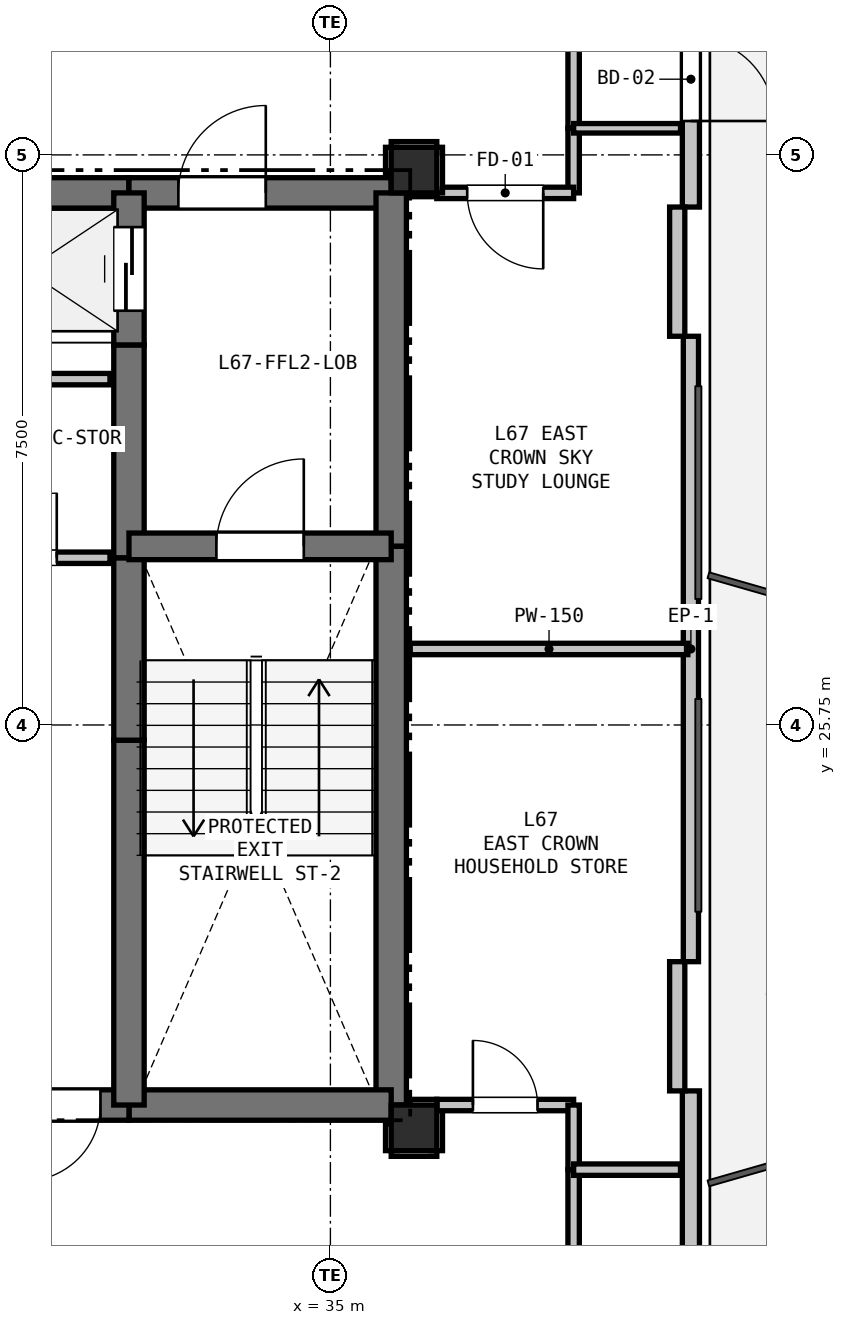
"""IFC4 building model, lengths in metres.
Left out: names, types, materials, properties, quantities, classifications, styles, units other than length and angle.
Written with IfcOpenShell. Run it as: python <this file> out.ifc"""

import sys

from ifc_helpers import new_model, si_unit, direction, frame, frame_2d, origin, origin_2d, place, context, subcontext, project, spatial, rectangle, extrude, element, fill, save


model = new_model("IFC4")
c1 = context("Model", 3, precision=1e-05, world=origin(), true_north=direction((0.0, 1.0)))
c2 = subcontext(c1, "Body", "Model", "MODEL_VIEW")
j1 = project(units=[si_unit("LENGTHUNIT", "METRE"), si_unit("PLANEANGLEUNIT", "RADIAN")], contexts=[c1])
p1 = place(None, origin())
s1 = spatial("IfcSite", under=j1, at=p1, CompositionType="ELEMENT")
p2 = place(p1, origin())
s2 = spatial("IfcBuilding", under=s1, at=p2, CompositionType="ELEMENT")
p3 = place(p2, frame((0.0, 0.0, 239.7)))
s3 = spatial("IfcBuildingStorey", under=s2, at=p3, CompositionType="ELEMENT", Elevation=239.7)
for number, where, z_axis, x_axis in (
    (1, (36.1, 33.05, 0.0), (0.0, 0.0, 1.0), (1.0, 0.0, 0.0)),
    (2, (36.1, 20.45, 0.0), (0.0, 0.0, 1.0), (1.0, 0.0, 0.0)),
):
    element("IfcColumn", number, at=place(p3, frame(where, z_axis=z_axis, x_axis=x_axis)), inside=s3, PredefinedType="COLUMN", context=c2, shape_type="SweptSolid", body=[
        extrude(rectangle(XDim=0.6, YDim=0.6, at=origin_2d()), origin(), (0.0, 0.0, 1.0), 3.3),
    ])
p4 = place(p3, frame((39.743, 41.492, 0.0), z_axis=(0.0, 0.0, 1.0), x_axis=(0.0, -1.0, 0.0)))
e3 = element("IfcWall", 3, at=p4, inside=s3, PredefinedType="SOLIDWALL", context=c2, shape_type="SweptSolid", body=[
    extrude(rectangle(XDim=8.928, YDim=0.225, at=frame_2d((4.464, 0.0))), origin(), (0.0, 0.0, 1.0), 2.7),
])
p5 = place(p4, frame((6.696, 0.0, 0.0)))
e4 = element("IfcOpeningElement", 4, at=p5, cuts=e3, PredefinedType="OPENING", context=c2, shape_type="SweptSolid", body=[
    extrude(rectangle(XDim=1.1, YDim=2.1, at=frame_2d((0.55, 1.05))), frame((0.0, 0.123, 0.0), z_axis=(0.0, -1.0, 0.0), x_axis=(1.0, 0.0, 0.0)), (0.0, 0.0, 1.0), 0.245),
])
p6 = place(p3, frame((39.743, 30.864, 0.0), z_axis=(0.0, 0.0, 1.0), x_axis=(0.0, -1.0, 0.0)))
e5 = element("IfcWall", 5, at=p6, inside=s3, PredefinedType="PARAPET", context=c2, shape_type="SweptSolid", body=[
    extrude(rectangle(XDim=8.228, YDim=0.2, at=frame_2d((4.114, 0.0))), origin(), (0.0, 0.0, 1.0), 0.2),
])
p7 = place(p3, frame((39.743, 20.936, 0.0), z_axis=(0.0, 0.0, 1.0), x_axis=(0.0, -1.0, 0.0)))
e6 = element("IfcWall", 6, at=p7, inside=s3, PredefinedType="SOLIDWALL", context=c2, shape_type="SweptSolid", body=[
    extrude(rectangle(XDim=8.928, YDim=0.225, at=frame_2d((4.464, 0.0))), origin(), (0.0, 0.0, 1.0), 2.7),
])
p8 = place(p7, frame((5.56, 0.0, 0.9)))
e7 = element("IfcOpeningElement", 7, at=p8, cuts=e6, PredefinedType="OPENING", context=c2, shape_type="SweptSolid", body=[
    extrude(rectangle(XDim=1.8, YDim=1.5, at=frame_2d((0.9, 0.75))), frame((0.0, 0.123, 0.0), z_axis=(0.0, -1.0, 0.0), x_axis=(1.0, 0.0, 0.0)), (0.0, 0.0, 1.0), 0.245),
])
for number, where, z_axis, x_axis in (
    (8, (39.563, 32.564, 0.0), (0.0, 0.0, 1.0), (0.0, -1.0, 0.0)),
    (9, (39.563, 22.636, 0.0), (0.0, 0.0, 1.0), (0.0, -1.0, 0.0)),
):
    element("IfcWall", number, at=place(p3, frame(where, z_axis=z_axis, x_axis=x_axis)), inside=s3, PredefinedType="PARAPET", context=c2, shape_type="SweptSolid", body=[
        extrude(rectangle(XDim=1.7, YDim=0.2, at=frame_2d((0.85, 0.0))), origin(), (0.0, 0.0, 1.0), 2.7),
    ])
p9 = place(p3, frame((29.65, 32.75, 0.0), z_axis=(0.0, 0.0, 1.0), x_axis=(1.0, 0.0, 0.0)))
e10 = element("IfcWall", 10, at=p9, inside=s3, PredefinedType="SHEAR", context=c2, shape_type="SweptSolid", body=[
    extrude(rectangle(XDim=2.7, YDim=0.4, at=frame_2d((1.35, 0.0))), origin(), (0.0, 0.0, 1.0), 3.08),
])
p10 = place(p3, frame((32.35, 32.75, 0.0), z_axis=(0.0, 0.0, 1.0), x_axis=(1.0, 0.0, 0.0)))
e11 = element("IfcWall", 11, at=p10, inside=s3, PredefinedType="SHEAR", context=c2, shape_type="SweptSolid", body=[
    extrude(rectangle(XDim=3.45, YDim=0.4, at=frame_2d((1.725, 0.0))), origin(), (0.0, 0.0, 1.0), 3.08),
])
p11 = place(p10, frame((0.65, 0.0, 0.0)))
e12 = element("IfcOpeningElement", 12, at=p11, cuts=e11, PredefinedType="OPENING", context=c2, shape_type="SweptSolid", body=[
    extrude(rectangle(XDim=1.15, YDim=2.15, at=frame_2d((0.575, 1.075))), frame((0.0, 0.21, 0.0), z_axis=(0.0, -1.0, 0.0), x_axis=(1.0, 0.0, 0.0)), (0.0, 0.0, 1.0), 0.42),
])
p12 = place(p3, frame((35.8, 32.75, 0.0), z_axis=(0.0, 0.0, 1.0), x_axis=(0.0, -1.0, 0.0)))
e13 = element("IfcWall", 13, at=p12, inside=s3, PredefinedType="SHEAR", context=c2, shape_type="SweptSolid", body=[
    extrude(rectangle(XDim=4.65, YDim=0.4, at=frame_2d((2.325, 0.0))), origin(), (0.0, 0.0, 1.0), 3.08),
])
p13 = place(p3, frame((35.8, 28.1, 0.0), z_axis=(0.0, 0.0, 1.0), x_axis=(0.0, -1.0, 0.0)))
e14 = element("IfcWall", 14, at=p13, inside=s3, PredefinedType="SHEAR", context=c2, shape_type="SweptSolid", body=[
    extrude(rectangle(XDim=7.35, YDim=0.4, at=frame_2d((3.675, 0.0))), origin(), (0.0, 0.0, 1.0), 3.08),
])
p14 = place(p3, frame((35.8, 20.75, 0.0), z_axis=(0.0, 0.0, 1.0), x_axis=(-1.0, 0.0, 0.0)))
e15 = element("IfcWall", 15, at=p14, inside=s3, PredefinedType="SHEAR", context=c2, shape_type="SweptSolid", body=[
    extrude(rectangle(XDim=3.45, YDim=0.4, at=frame_2d((1.725, 0.0))), origin(), (0.0, 0.0, 1.0), 3.08),
])
p15 = place(p3, frame((32.35, 20.75, 0.0), z_axis=(0.0, 0.0, 1.0), x_axis=(-1.0, 0.0, 0.0)))
e16 = element("IfcWall", 16, at=p15, inside=s3, PredefinedType="SHEAR", context=c2, shape_type="SweptSolid", body=[
    extrude(rectangle(XDim=1.75, YDim=0.4, at=frame_2d((0.875, 0.0))), origin(), (0.0, 0.0, 1.0), 3.08),
])
p16 = place(p15, frame((0.375, 0.0, 0.0)))
e17 = element("IfcOpeningElement", 17, at=p16, cuts=e16, PredefinedType="OPENING", context=c2, shape_type="SweptSolid", body=[
    extrude(rectangle(XDim=1.0, YDim=2.15, at=frame_2d((0.5, 1.075))), frame((0.0, 0.21, 0.0), z_axis=(0.0, -1.0, 0.0), x_axis=(1.0, 0.0, 0.0)), (0.0, 0.0, 1.0), 0.42),
])
p17 = place(p3, frame((32.35, 20.75, 0.0), z_axis=(0.0, 0.0, 1.0), x_axis=(0.0, 1.0, 0.0)))
e18 = element("IfcWall", 18, at=p17, inside=s3, PredefinedType="SHEAR", context=c2, shape_type="SweptSolid", body=[
    extrude(rectangle(XDim=4.8, YDim=0.4, at=frame_2d((2.4, 0.0))), origin(), (0.0, 0.0, 1.0), 3.08),
])
p18 = place(p3, frame((32.35, 25.55, 0.0), z_axis=(0.0, 0.0, 1.0), x_axis=(0.0, 1.0, 0.0)))
e19 = element("IfcWall", 19, at=p18, inside=s3, PredefinedType="SHEAR", context=c2, shape_type="SweptSolid", body=[
    extrude(rectangle(XDim=2.4, YDim=0.4, at=frame_2d((1.2, 0.0))), origin(), (0.0, 0.0, 1.0), 3.08),
])
p19 = place(p3, frame((32.35, 27.95, 0.0), z_axis=(0.0, 0.0, 1.0), x_axis=(0.0, 1.0, 0.0)))
e20 = element("IfcWall", 20, at=p19, inside=s3, PredefinedType="SHEAR", context=c2, shape_type="SweptSolid", body=[
    extrude(rectangle(XDim=2.8, YDim=0.4, at=frame_2d((1.4, 0.0))), origin(), (0.0, 0.0, 1.0), 3.08),
])
p20 = place(p3, frame((32.35, 30.75, 0.0), z_axis=(0.0, 0.0, 1.0), x_axis=(0.0, 1.0, 0.0)))
e21 = element("IfcWall", 21, at=p20, inside=s3, PredefinedType="SHEAR", context=c2, shape_type="SweptSolid", body=[
    extrude(rectangle(XDim=2.0, YDim=0.4, at=frame_2d((1.0, 0.0))), origin(), (0.0, 0.0, 1.0), 3.08),
])
p21 = place(p20, frame((0.45, 0.0, 0.0)))
e22 = element("IfcOpeningElement", 22, at=p21, cuts=e21, PredefinedType="OPENING", context=c2, shape_type="SweptSolid", body=[
    extrude(rectangle(XDim=1.1, YDim=2.15, at=frame_2d((0.55, 1.075))), frame((0.0, 0.21, 0.0), z_axis=(0.0, -1.0, 0.0), x_axis=(1.0, 0.0, 0.0)), (0.0, 0.0, 1.0), 0.42),
])
p22 = place(p3, frame((32.35, 28.1, 0.0), z_axis=(0.0, 0.0, 1.0), x_axis=(1.0, 0.0, 0.0)))
e23 = element("IfcWall", 23, at=p22, inside=s3, PredefinedType="SHEAR", context=c2, shape_type="SweptSolid", body=[
    extrude(rectangle(XDim=3.45, YDim=0.35, at=frame_2d((1.725, 0.0))), origin(), (0.0, 0.0, 1.0), 3.08),
])
p23 = place(p22, frame((1.15, 0.0, 0.0)))
e24 = element("IfcOpeningElement", 24, at=p23, cuts=e23, PredefinedType="OPENING", context=c2, shape_type="SweptSolid", body=[
    extrude(rectangle(XDim=1.15, YDim=2.15, at=frame_2d((0.575, 1.075))), frame((0.0, 0.185, 0.0), z_axis=(0.0, -1.0, 0.0), x_axis=(1.0, 0.0, 0.0)), (0.0, 0.0, 1.0), 0.37),
])
p24 = place(p3, frame((32.1, 30.3, 0.0), z_axis=(0.0, 0.0, 1.0), x_axis=(-1.0, 0.0, 0.0)))
e25 = element("IfcWall", 25, at=p24, inside=s3, PredefinedType="PARTITIONING", context=c2, shape_type="SweptSolid", body=[
    extrude(rectangle(XDim=2.25, YDim=0.15, at=frame_2d((1.125, 0.0))), origin(), (0.0, 0.0, 1.0), 3.08),
])
p25 = place(p3, frame((29.85, 27.95, 0.0), z_axis=(0.0, 0.0, 1.0), x_axis=(1.0, 0.0, 0.0)))
e26 = element("IfcWall", 26, at=p25, inside=s3, PredefinedType="PARTITIONING", context=c2, shape_type="SweptSolid", body=[
    extrude(rectangle(XDim=2.25, YDim=0.15, at=frame_2d((1.125, 0.0))), origin(), (0.0, 0.0, 1.0), 3.08),
])
p26 = place(p25, frame((0.7, 0.0, 0.0)))
e27 = element("IfcOpeningElement", 27, at=p26, cuts=e26, PredefinedType="OPENING", context=c2, shape_type="SweptSolid", body=[
    extrude(rectangle(XDim=0.85, YDim=2.1, at=frame_2d((0.425, 1.05))), frame((0.0, 0.085, 0.0), z_axis=(0.0, -1.0, 0.0), x_axis=(1.0, 0.0, 0.0)), (0.0, 0.0, 1.0), 0.17),
])
p27 = place(p3, frame((38.2, 35.2, 0.0), z_axis=(0.0, 0.0, 1.0), x_axis=(0.0, -1.0, 0.0)))
e28 = element("IfcWall", 28, at=p27, inside=s3, PredefinedType="PARTITIONING", context=c2, shape_type="SweptSolid", body=[
    extrude(rectangle(XDim=1.6, YDim=0.15, at=frame_2d((0.8, 0.0))), origin(), (0.0, 0.0, 1.0), 3.08),
])
p28 = place(p3, frame((38.2, 33.6, 0.0), z_axis=(0.0, 0.0, 1.0), x_axis=(0.0, -1.0, 0.0)))
e29 = element("IfcWall", 29, at=p28, inside=s3, PredefinedType="PARTITIONING", context=c2, shape_type="SweptSolid", body=[
    extrude(rectangle(XDim=0.85, YDim=0.15, at=frame_2d((0.425, 0.0))), origin(), (0.0, 0.0, 1.0), 3.08),
])
p29 = place(p3, frame((38.2, 32.75, 0.0), z_axis=(0.0, 0.0, 1.0), x_axis=(-1.0, 0.0, 0.0)))
e30 = element("IfcWall", 30, at=p29, inside=s3, PredefinedType="PARTITIONING", context=c2, shape_type="SweptSolid", body=[
    extrude(rectangle(XDim=1.8, YDim=0.15, at=frame_2d((0.9, 0.0))), origin(), (0.0, 0.0, 1.0), 3.08),
])
p30 = place(p29, frame((0.4, 0.0, 0.0)))
e31 = element("IfcOpeningElement", 31, at=p30, cuts=e30, PredefinedType="OPENING", context=c2, shape_type="SweptSolid", body=[
    extrude(rectangle(XDim=1.0, YDim=2.15, at=frame_2d((0.5, 1.075))), frame((0.0, 0.085, 0.0), z_axis=(0.0, -1.0, 0.0), x_axis=(1.0, 0.0, 0.0)), (0.0, 0.0, 1.0), 0.17),
])
p31 = place(p3, frame((36.4, 32.75, 0.0), z_axis=(0.0, 0.0, 1.0), x_axis=(0.0, 1.0, 0.0)))
e32 = element("IfcWall", 32, at=p31, inside=s3, PredefinedType="PARTITIONING", context=c2, shape_type="SweptSolid", body=[
    extrude(rectangle(XDim=0.6, YDim=0.15, at=frame_2d((0.3, 0.0))), origin(), (0.0, 0.0, 1.0), 2.528),
])
p32 = place(p3, frame((36.4, 33.35, 0.0), z_axis=(0.0, 0.0, 1.0), x_axis=(-1.0, 0.0, 0.0)))
e33 = element("IfcWall", 33, at=p32, inside=s3, PredefinedType="PARTITIONING", context=c2, shape_type="SweptSolid", body=[
    extrude(rectangle(XDim=0.6, YDim=0.15, at=frame_2d((0.3, 0.0))), origin(), (0.0, 0.0, 1.0), 2.528),
])
p33 = place(p3, frame((35.8, 33.35, 0.0), z_axis=(0.0, 0.0, 1.0), x_axis=(0.0, -1.0, 0.0)))
e34 = element("IfcWall", 34, at=p33, inside=s3, PredefinedType="PARTITIONING", context=c2, shape_type="SweptSolid", body=[
    extrude(rectangle(XDim=0.35, YDim=0.15, at=frame_2d((0.175, 0.0))), origin(), (0.0, 0.0, 1.0), 2.605),
])
p34 = place(p3, frame((35.8, 20.15, 0.0), z_axis=(0.0, 0.0, 1.0), x_axis=(1.0, 0.0, 0.0)))
e35 = element("IfcWall", 35, at=p34, inside=s3, PredefinedType="PARTITIONING", context=c2, shape_type="SweptSolid", body=[
    extrude(rectangle(XDim=0.6, YDim=0.15, at=frame_2d((0.3, 0.0))), origin(), (0.0, 0.0, 1.0), 2.528),
])
p35 = place(p3, frame((36.4, 20.15, 0.0), z_axis=(0.0, 0.0, 1.0), x_axis=(0.0, 1.0, 0.0)))
e36 = element("IfcWall", 36, at=p35, inside=s3, PredefinedType="PARTITIONING", context=c2, shape_type="SweptSolid", body=[
    extrude(rectangle(XDim=0.6, YDim=0.15, at=frame_2d((0.3, 0.0))), origin(), (0.0, 0.0, 1.0), 3.08),
])
p36 = place(p3, frame((36.4, 20.75, 0.0), z_axis=(0.0, 0.0, 1.0), x_axis=(1.0, 0.0, 0.0)))
e37 = element("IfcWall", 37, at=p36, inside=s3, PredefinedType="PARTITIONING", context=c2, shape_type="SweptSolid", body=[
    extrude(rectangle(XDim=1.8, YDim=0.15, at=frame_2d((0.9, 0.0))), origin(), (0.0, 0.0, 1.0), 3.08),
])
p37 = place(p36, frame((0.475, 0.0, 0.0)))
e38 = element("IfcOpeningElement", 38, at=p37, cuts=e37, PredefinedType="OPENING", context=c2, shape_type="SweptSolid", body=[
    extrude(rectangle(XDim=0.85, YDim=2.1, at=frame_2d((0.425, 1.05))), frame((0.0, 0.085, 0.0), z_axis=(0.0, -1.0, 0.0), x_axis=(1.0, 0.0, 0.0)), (0.0, 0.0, 1.0), 0.17),
])
p38 = place(p3, frame((38.2, 20.75, 0.0), z_axis=(0.0, 0.0, 1.0), x_axis=(0.0, -1.0, 0.0)))
e39 = element("IfcWall", 39, at=p38, inside=s3, PredefinedType="PARTITIONING", context=c2, shape_type="SweptSolid", body=[
    extrude(rectangle(XDim=0.85, YDim=0.15, at=frame_2d((0.425, 0.0))), origin(), (0.0, 0.0, 1.0), 3.08),
])
p39 = place(p3, frame((38.2, 19.9, 0.0), z_axis=(0.0, 0.0, 1.0), x_axis=(0.0, -1.0, 0.0)))
e40 = element("IfcWall", 40, at=p39, inside=s3, PredefinedType="PARTITIONING", context=c2, shape_type="SweptSolid", body=[
    extrude(rectangle(XDim=1.6, YDim=0.15, at=frame_2d((0.8, 0.0))), origin(), (0.0, 0.0, 1.0), 3.08),
])
p40 = place(p3, frame((35.8, 20.5, 0.0), z_axis=(0.0, 0.0, 1.0), x_axis=(0.0, -1.0, 0.0)))
e41 = element("IfcWall", 41, at=p40, inside=s3, PredefinedType="PARTITIONING", context=c2, shape_type="SweptSolid", body=[
    extrude(rectangle(XDim=0.35, YDim=0.15, at=frame_2d((0.175, 0.0))), origin(), (0.0, 0.0, 1.0), 2.605),
])
p41 = place(p3, frame((36.05, 32.75, 0.0), z_axis=(0.0, 0.0, 1.0), x_axis=(1.0, 0.0, 0.0)))
e42 = element("IfcWall", 42, at=p41, inside=s3, PredefinedType="PARTITIONING", context=c2, shape_type="SweptSolid", body=[
    extrude(rectangle(XDim=0.35, YDim=0.1, at=frame_2d((0.175, 0.0))), origin(), (0.0, 0.0, 1.0), 2.605),
])
p42 = place(p3, frame((38.2, 33.6, 0.0), z_axis=(0.0, 0.0, 1.0), x_axis=(1.0, 0.0, 0.0)))
e43 = element("IfcWall", 43, at=p42, inside=s3, PredefinedType="PARTITIONING", context=c2, shape_type="SweptSolid", body=[
    extrude(rectangle(XDim=1.406, YDim=0.125, at=frame_2d((0.703, 0.0))), origin(), (0.0, 0.0, 1.0), 2.365),
])
p43 = place(p3, frame((39.703, 26.75, 0.0), z_axis=(0.0, 0.0, 1.0), x_axis=(-1.0, 0.0, 0.0)))
e44 = element("IfcWall", 44, at=p43, inside=s3, PredefinedType="PARTITIONING", context=c2, shape_type="SweptSolid", body=[
    extrude(rectangle(XDim=3.653, YDim=0.15, at=frame_2d((1.826, 0.0))), origin(), (0.0, 0.0, 1.0), 2.365),
])
p44 = place(p3, frame((36.4, 20.75, 0.0), z_axis=(0.0, 0.0, 1.0), x_axis=(-1.0, 0.0, 0.0)))
e45 = element("IfcWall", 45, at=p44, inside=s3, PredefinedType="PARTITIONING", context=c2, shape_type="SweptSolid", body=[
    extrude(rectangle(XDim=0.35, YDim=0.15, at=frame_2d((0.175, 0.0))), origin(), (0.0, 0.0, 1.0), 2.605),
])
p45 = place(p3, frame((39.606, 19.9, 0.0), z_axis=(0.0, 0.0, 1.0), x_axis=(-1.0, 0.0, 0.0)))
e46 = element("IfcWall", 46, at=p45, inside=s3, PredefinedType="PARTITIONING", context=c2, shape_type="SweptSolid", body=[
    extrude(rectangle(XDim=1.406, YDim=0.15, at=frame_2d((0.703, 0.0))), origin(), (0.0, 0.0, 1.0), 2.365),
])
p46 = place(p5, origin())
e47 = element("IfcDoor", 47, at=p46, inside=s3, OperationType="SINGLE_SWING_RIGHT", PredefinedType="DOOR", context=c2, shape_type="SweptSolid", body=[
    extrude(rectangle(XDim=1.1, YDim=2.1, at=frame_2d((0.55, 1.05))), frame((0.0, 0.025, 0.0), z_axis=(0.0, -1.0, 0.0), x_axis=(1.0, 0.0, 0.0)), (0.0, 0.0, 1.0), 0.05),
])
fill(e4, e47)
p47 = place(p16, origin())
e48 = element("IfcDoor", 48, at=p47, inside=s3, OperationType="SINGLE_SWING_RIGHT", PredefinedType="DOOR", context=c2, shape_type="SweptSolid", body=[
    extrude(rectangle(XDim=1.0, YDim=2.15, at=frame_2d((0.5, 1.075))), frame((0.0, 0.025, 0.0), z_axis=(0.0, -1.0, 0.0), x_axis=(1.0, 0.0, 0.0)), (0.0, 0.0, 1.0), 0.05),
])
fill(e17, e48)
p48 = place(p21, origin())
e49 = element("IfcDoor", 49, at=p48, inside=s3, OperationType="SLIDING_TO_LEFT", PredefinedType="DOOR", context=c2, shape_type="SweptSolid", body=[
    extrude(rectangle(XDim=1.1, YDim=2.15, at=frame_2d((0.55, 1.075))), frame((0.0, 0.025, 0.0), z_axis=(0.0, -1.0, 0.0), x_axis=(1.0, 0.0, 0.0)), (0.0, 0.0, 1.0), 0.05),
])
fill(e22, e49)
p49 = place(p23, origin())
e50 = element("IfcDoor", 50, at=p49, inside=s3, OperationType="SINGLE_SWING_RIGHT", PredefinedType="DOOR", context=c2, shape_type="SweptSolid", body=[
    extrude(rectangle(XDim=1.15, YDim=2.15, at=frame_2d((0.575, 1.075))), frame((0.0, 0.025, 0.0), z_axis=(0.0, -1.0, 0.0), x_axis=(1.0, 0.0, 0.0)), (0.0, 0.0, 1.0), 0.05),
])
fill(e24, e50)
p50 = place(p11, origin())
e51 = element("IfcDoor", 51, at=p50, inside=s3, OperationType="SINGLE_SWING_RIGHT", PredefinedType="DOOR", context=c2, shape_type="SweptSolid", body=[
    extrude(rectangle(XDim=1.15, YDim=2.15, at=frame_2d((0.575, 1.075))), frame((0.0, 0.025, 0.0), z_axis=(0.0, -1.0, 0.0), x_axis=(1.0, 0.0, 0.0)), (0.0, 0.0, 1.0), 0.05),
])
fill(e12, e51)
p51 = place(p26, origin())
e52 = element("IfcDoor", 52, at=p51, inside=s3, OperationType="SINGLE_SWING_RIGHT", PredefinedType="DOOR", context=c2, shape_type="SweptSolid", body=[
    extrude(rectangle(XDim=0.85, YDim=2.1, at=frame_2d((0.425, 1.05))), frame((0.0, 0.025, 0.0), z_axis=(0.0, -1.0, 0.0), x_axis=(1.0, 0.0, 0.0)), (0.0, 0.0, 1.0), 0.05),
])
fill(e27, e52)
p52 = place(p30, origin())
e53 = element("IfcDoor", 53, at=p52, inside=s3, OperationType="SINGLE_SWING_LEFT", PredefinedType="DOOR", context=c2, shape_type="SweptSolid", body=[
    extrude(rectangle(XDim=1.0, YDim=2.15, at=frame_2d((0.5, 1.075))), frame((0.0, 0.025, 0.0), z_axis=(0.0, -1.0, 0.0), x_axis=(1.0, 0.0, 0.0)), (0.0, 0.0, 1.0), 0.05),
])
fill(e31, e53)
p53 = place(p37, origin())
e54 = element("IfcDoor", 54, at=p53, inside=s3, OperationType="SINGLE_SWING_LEFT", PredefinedType="DOOR", context=c2, shape_type="SweptSolid", body=[
    extrude(rectangle(XDim=0.85, YDim=2.1, at=frame_2d((0.425, 1.05))), frame((0.0, 0.025, 0.0), z_axis=(0.0, -1.0, 0.0), x_axis=(1.0, 0.0, 0.0)), (0.0, 0.0, 1.0), 0.05),
])
fill(e38, e54)
save(model, sys.argv[1])
